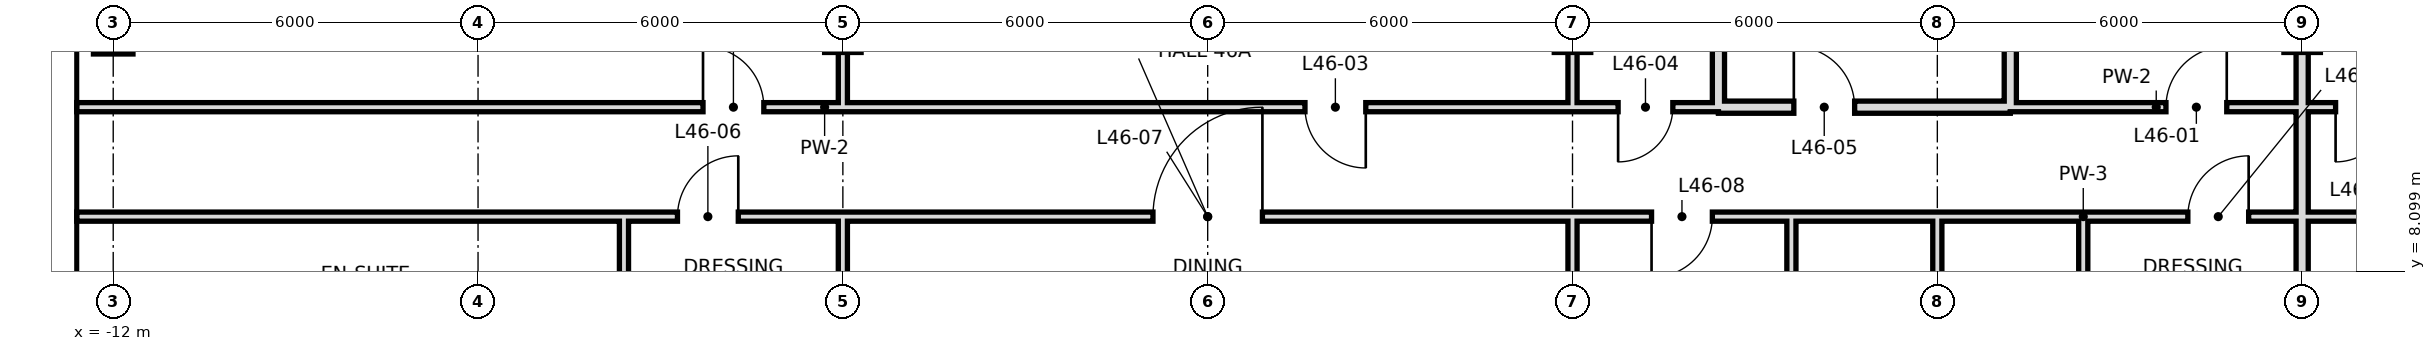
"""IFC4 building model, lengths in metres.
Left out: names, types, materials, properties, quantities, classifications, styles, units other than length and angle.
Written with IfcOpenShell. Run it as: python <this file> out.ifc"""

import sys

from ifc_helpers import new_model, si_unit, direction, frame, frame_2d, origin, origin_2d, place, context, subcontext, project, spatial, rectangle, hollow_rectangle, extrude, element, fill, save


model = new_model("IFC4")
c1 = context("Model", 3, precision=1e-05, world=origin(), true_north=direction((0.0, 1.0)))
c2 = subcontext(c1, "Body", "Model", "MODEL_VIEW")
j1 = project(units=[si_unit("LENGTHUNIT", "METRE"), si_unit("PLANEANGLEUNIT", "RADIAN")], contexts=[c1])
p1 = place(None, origin())
s1 = spatial("IfcSite", under=j1, at=p1, CompositionType="ELEMENT")
p2 = place(p1, origin())
s2 = spatial("IfcBuilding", under=s1, at=p2, CompositionType="ELEMENT")
p3 = place(p2, frame((0.0, 0.0, 199.2)))
s3 = spatial("IfcBuildingStorey", under=s2, at=p3, CompositionType="ELEMENT", Elevation=199.2)
p4 = place(p3, frame((-12.0, 12.0, 0.0), z_axis=(0.0, 0.0, 1.0), x_axis=(1.0, 0.0, 0.0)))
e1 = element("IfcColumn", 1, at=p4, inside=s3, PredefinedType="COLUMN", context=c2, shape_type="SweptSolid", body=[
    extrude(hollow_rectangle(XDim=0.65, YDim=0.65, WallThickness=0.032, at=origin_2d()), origin(), (0.0, 0.0, 1.0), 3.6),
])
p5 = place(p3, frame((-3.6, 6.0, 0.0), z_axis=(0.0, 0.0, 1.0), x_axis=(0.0, 1.0, 0.0)))
e2 = element("IfcWall", 2, at=p5, inside=s3, PredefinedType="PARTITIONING", context=c2, shape_type="SweptSolid", body=[
    extrude(rectangle(XDim=3.0, YDim=0.15, at=frame_2d((1.5, 0.0))), origin(), (0.0, 0.0, 1.0), 3.42),
])
p6 = place(p3, frame((0.0, 0.0, 0.0), z_axis=(0.0, 0.0, 1.0), x_axis=(0.0, 1.0, 0.0)))
e3 = element("IfcWall", 3, at=p6, inside=s3, PredefinedType="PARTITIONING", context=c2, shape_type="SweptSolid", body=[
    extrude(rectangle(XDim=9.0, YDim=0.15, at=frame_2d((4.5, 0.0))), origin(), (0.0, 0.0, 1.0), 2.72),
])
p7 = place(p3, frame((0.0, 10.8, 0.0), z_axis=(0.0, 0.0, 1.0), x_axis=(0.0, 1.0, 0.0)))
e4 = element("IfcWall", 4, at=p7, inside=s3, PredefinedType="PARTITIONING", context=c2, shape_type="SweptSolid", body=[
    extrude(rectangle(XDim=7.2, YDim=0.15, at=frame_2d((3.6, 0.0))), origin(), (0.0, 0.0, 1.0), 2.72),
])
p8 = place(p3, frame((12.0, 0.0, 0.0), z_axis=(0.0, 0.0, 1.0), x_axis=(0.0, 1.0, 0.0)))
e5 = element("IfcWall", 5, at=p8, inside=s3, PredefinedType="PARTITIONING", context=c2, shape_type="SweptSolid", body=[
    extrude(rectangle(XDim=9.0, YDim=0.15, at=frame_2d((4.5, 0.0))), origin(), (0.0, 0.0, 1.0), 2.72),
])
p9 = place(p3, frame((12.0, 10.8, 0.0), z_axis=(0.0, 0.0, 1.0), x_axis=(0.0, 1.0, 0.0)))
e6 = element("IfcWall", 6, at=p9, inside=s3, PredefinedType="PARTITIONING", context=c2, shape_type="SweptSolid", body=[
    extrude(rectangle(XDim=4.5, YDim=0.15, at=frame_2d((2.25, 0.0))), origin(), (0.0, 0.0, 1.0), 2.72),
])
p10 = place(p3, frame((14.4, 10.8, 0.0), z_axis=(0.0, 0.0, 1.0), x_axis=(0.0, 1.0, 0.0)))
e7 = element("IfcWall", 7, at=p10, inside=s3, PredefinedType="SOLIDWALL", context=c2, shape_type="SweptSolid", body=[
    extrude(rectangle(XDim=4.5, YDim=0.2, at=frame_2d((2.25, 0.0))), origin(), (0.0, 0.0, 1.0), 2.72),
])
p11 = place(p3, frame((15.6, 6.0, 0.0), z_axis=(0.0, 0.0, 1.0), x_axis=(0.0, 1.0, 0.0)))
e8 = element("IfcWall", 8, at=p11, inside=s3, PredefinedType="PARTITIONING", context=c2, shape_type="SweptSolid", body=[
    extrude(rectangle(XDim=3.0, YDim=0.15, at=frame_2d((1.5, 0.0))), origin(), (0.0, 0.0, 1.0), 3.42),
])
p12 = place(p3, frame((18.0, 6.0, 0.0), z_axis=(0.0, 0.0, 1.0), x_axis=(0.0, 1.0, 0.0)))
e9 = element("IfcWall", 9, at=p12, inside=s3, PredefinedType="PARTITIONING", context=c2, shape_type="SweptSolid", body=[
    extrude(rectangle(XDim=3.0, YDim=0.15, at=frame_2d((1.5, 0.0))), origin(), (0.0, 0.0, 1.0), 2.72),
])
p13 = place(p3, frame((19.2, 10.8, 0.0), z_axis=(0.0, 0.0, 1.0), x_axis=(0.0, 1.0, 0.0)))
e10 = element("IfcWall", 10, at=p13, inside=s3, PredefinedType="SOLIDWALL", context=c2, shape_type="SweptSolid", body=[
    extrude(rectangle(XDim=4.5, YDim=0.2, at=frame_2d((2.25, 0.0))), origin(), (0.0, 0.0, 1.0), 2.72),
])
p14 = place(p3, frame((20.4, 6.0, 0.0), z_axis=(0.0, 0.0, 1.0), x_axis=(0.0, 1.0, 0.0)))
e11 = element("IfcWall", 11, at=p14, inside=s3, PredefinedType="PARTITIONING", context=c2, shape_type="SweptSolid", body=[
    extrude(rectangle(XDim=3.0, YDim=0.15, at=frame_2d((1.5, 0.0))), origin(), (0.0, 0.0, 1.0), 3.42),
])
p15 = place(p3, frame((24.0, 0.0, 0.0), z_axis=(0.0, 0.0, 1.0), x_axis=(0.0, 1.0, 0.0)))
e12 = element("IfcWall", 12, at=p15, inside=s3, PredefinedType="SOLIDWALL", context=c2, shape_type="SweptSolid", body=[
    extrude(rectangle(XDim=15.3, YDim=0.2, at=frame_2d((7.65, 0.0))), origin(), (0.0, 0.0, 1.0), 2.72),
])
p16 = place(p3, frame((14.4, 10.8, 0.0), z_axis=(0.0, 0.0, 1.0), x_axis=(1.0, 0.0, 0.0)))
e13 = element("IfcWall", 13, at=p16, inside=s3, PredefinedType="SOLIDWALL", context=c2, shape_type="SweptSolid", body=[
    extrude(rectangle(XDim=4.8, YDim=0.2, at=frame_2d((2.4, 0.0))), origin(), (0.0, 0.0, 1.0), 2.72),
])
p17 = place(p16, frame((1.24, 0.0, 0.0)))
e14 = element("IfcOpeningElement", 14, at=p17, cuts=e13, PredefinedType="OPENING", context=c2, shape_type="SweptSolid", body=[
    extrude(rectangle(XDim=1.0, YDim=2.4, at=frame_2d((0.5, 1.2))), frame((0.0, 0.11, 0.0), z_axis=(0.0, -1.0, 0.0), x_axis=(1.0, 0.0, 0.0)), (0.0, 0.0, 1.0), 0.22),
])
p18 = place(p3, frame((-12.6, 10.8, 0.0), z_axis=(0.0, 0.0, 1.0), x_axis=(1.0, 0.0, 0.0)))
e15 = element("IfcWall", 15, at=p18, inside=s3, PredefinedType="PARTITIONING", context=c2, shape_type="SweptSolid", body=[
    extrude(rectangle(XDim=24.6, YDim=0.15, at=frame_2d((12.3, 0.0))), origin(), (0.0, 0.0, 1.0), 3.42),
])
p19 = place(p18, frame((10.3, 0.0, 0.0)))
e16 = element("IfcOpeningElement", 16, at=p19, cuts=e15, PredefinedType="OPENING", context=c2, shape_type="SweptSolid", body=[
    extrude(rectangle(XDim=1.0, YDim=2.4, at=frame_2d((0.5, 1.2))), frame((0.0, 0.085, 0.0), z_axis=(0.0, -1.0, 0.0), x_axis=(1.0, 0.0, 0.0)), (0.0, 0.0, 1.0), 0.17),
])
p20 = place(p18, frame((20.2, 0.0, 0.0)))
e17 = element("IfcOpeningElement", 17, at=p20, cuts=e15, PredefinedType="OPENING", context=c2, shape_type="SweptSolid", body=[
    extrude(rectangle(XDim=1.0, YDim=2.4, at=frame_2d((0.5, 1.2))), frame((0.0, 0.085, 0.0), z_axis=(0.0, -1.0, 0.0), x_axis=(1.0, 0.0, 0.0)), (0.0, 0.0, 1.0), 0.17),
])
p21 = place(p3, frame((19.2, 10.8, 0.0), z_axis=(0.0, 0.0, 1.0), x_axis=(1.0, 0.0, 0.0)))
e18 = element("IfcWall", 18, at=p21, inside=s3, PredefinedType="PARTITIONING", context=c2, shape_type="SweptSolid", body=[
    extrude(rectangle(XDim=4.8, YDim=0.15, at=frame_2d((2.4, 0.0))), origin(), (0.0, 0.0, 1.0), 3.42),
])
p22 = place(p21, frame((2.56, 0.0, 0.0)))
e19 = element("IfcOpeningElement", 19, at=p22, cuts=e18, PredefinedType="OPENING", context=c2, shape_type="SweptSolid", body=[
    extrude(rectangle(XDim=1.0, YDim=2.4, at=frame_2d((0.5, 1.2))), frame((0.0, 0.085, 0.0), z_axis=(0.0, -1.0, 0.0), x_axis=(1.0, 0.0, 0.0)), (0.0, 0.0, 1.0), 0.17),
])
p23 = place(p3, frame((12.0, 10.8, 0.0), z_axis=(0.0, 0.0, 1.0), x_axis=(1.0, 0.0, 0.0)))
e20 = element("IfcWall", 20, at=p23, inside=s3, PredefinedType="PARTITIONING", context=c2, shape_type="SweptSolid", body=[
    extrude(rectangle(XDim=2.4, YDim=0.15, at=frame_2d((1.2, 0.0))), origin(), (0.0, 0.0, 1.0), 3.42),
])
p24 = place(p23, frame((0.75, 0.0, 0.0)))
e21 = element("IfcOpeningElement", 21, at=p24, cuts=e20, PredefinedType="OPENING", context=c2, shape_type="SweptSolid", body=[
    extrude(rectangle(XDim=0.9, YDim=2.4, at=frame_2d((0.45, 1.2))), frame((0.0, 0.085, 0.0), z_axis=(0.0, -1.0, 0.0), x_axis=(1.0, 0.0, 0.0)), (0.0, 0.0, 1.0), 0.17),
])
p25 = place(p3, frame((24.0, 10.8, 0.0), z_axis=(0.0, 0.0, 1.0), x_axis=(1.0, 0.0, 0.0)))
e22 = element("IfcWall", 22, at=p25, inside=s3, PredefinedType="PARTITIONING", context=c2, shape_type="SweptSolid", body=[
    extrude(rectangle(XDim=2.4, YDim=0.15, at=frame_2d((1.2, 0.0))), origin(), (0.0, 0.0, 1.0), 3.42),
])
p26 = place(p25, frame((0.55, 0.0, 0.0)))
e23 = element("IfcOpeningElement", 23, at=p26, cuts=e22, PredefinedType="OPENING", context=c2, shape_type="SweptSolid", body=[
    extrude(rectangle(XDim=0.9, YDim=2.4, at=frame_2d((0.45, 1.2))), frame((0.0, 0.085, 0.0), z_axis=(0.0, -1.0, 0.0), x_axis=(1.0, 0.0, 0.0)), (0.0, 0.0, 1.0), 0.17),
])
p27 = place(p3, frame((-3.6, 9.0, 0.0), z_axis=(0.0, 0.0, 1.0), x_axis=(1.0, 0.0, 0.0)))
e24 = element("IfcWall", 24, at=p27, inside=s3, PredefinedType="PARTITIONING", context=c2, shape_type="SweptSolid", body=[
    extrude(rectangle(XDim=19.2, YDim=0.15, at=frame_2d((9.6, 0.0))), origin(), (0.0, 0.0, 1.0), 3.42),
])
p28 = place(p27, frame((0.88, 0.0, 0.0)))
e25 = element("IfcOpeningElement", 25, at=p28, cuts=e24, PredefinedType="OPENING", context=c2, shape_type="SweptSolid", body=[
    extrude(rectangle(XDim=1.0, YDim=2.4, at=frame_2d((0.5, 1.2))), frame((0.0, 0.085, 0.0), z_axis=(0.0, -1.0, 0.0), x_axis=(1.0, 0.0, 0.0)), (0.0, 0.0, 1.0), 0.17),
])
p29 = place(p27, frame((8.7, 0.0, 0.0)))
e26 = element("IfcOpeningElement", 26, at=p29, cuts=e24, PredefinedType="OPENING", context=c2, shape_type="SweptSolid", body=[
    extrude(rectangle(XDim=1.8, YDim=2.4, at=frame_2d((0.9, 1.2))), frame((0.0, 0.085, 0.0), z_axis=(0.0, -1.0, 0.0), x_axis=(1.0, 0.0, 0.0)), (0.0, 0.0, 1.0), 0.17),
])
p30 = place(p27, frame((16.9, 0.0, 0.0)))
e27 = element("IfcOpeningElement", 27, at=p30, cuts=e24, PredefinedType="OPENING", context=c2, shape_type="SweptSolid", body=[
    extrude(rectangle(XDim=1.0, YDim=2.4, at=frame_2d((0.5, 1.2))), frame((0.0, 0.085, 0.0), z_axis=(0.0, -1.0, 0.0), x_axis=(1.0, 0.0, 0.0)), (0.0, 0.0, 1.0), 0.17),
])
p31 = place(p3, frame((20.4, 9.0, 0.0), z_axis=(0.0, 0.0, 1.0), x_axis=(1.0, 0.0, 0.0)))
e28 = element("IfcWall", 28, at=p31, inside=s3, PredefinedType="PARTITIONING", context=c2, shape_type="SweptSolid", body=[
    extrude(rectangle(XDim=18.6, YDim=0.15, at=frame_2d((9.3, 0.0))), origin(), (0.0, 0.0, 1.0), 3.42),
])
p32 = place(p31, frame((1.72, 0.0, 0.0)))
e29 = element("IfcOpeningElement", 29, at=p32, cuts=e28, PredefinedType="OPENING", context=c2, shape_type="SweptSolid", body=[
    extrude(rectangle(XDim=1.0, YDim=2.4, at=frame_2d((0.5, 1.2))), frame((0.0, 0.085, 0.0), z_axis=(0.0, -1.0, 0.0), x_axis=(1.0, 0.0, 0.0)), (0.0, 0.0, 1.0), 0.17),
])
p33 = place(p31, frame((7.0, 0.0, 0.0)))
e30 = element("IfcOpeningElement", 30, at=p33, cuts=e28, PredefinedType="OPENING", context=c2, shape_type="SweptSolid", body=[
    extrude(rectangle(XDim=1.0, YDim=2.4, at=frame_2d((0.5, 1.2))), frame((0.0, 0.085, 0.0), z_axis=(0.0, -1.0, 0.0), x_axis=(1.0, 0.0, 0.0)), (0.0, 0.0, 1.0), 0.17),
])
p34 = place(p31, frame((16.3, 0.0, 0.0)))
e31 = element("IfcOpeningElement", 31, at=p34, cuts=e28, PredefinedType="OPENING", context=c2, shape_type="SweptSolid", body=[
    extrude(rectangle(XDim=1.0, YDim=2.4, at=frame_2d((0.5, 1.2))), frame((0.0, 0.085, 0.0), z_axis=(0.0, -1.0, 0.0), x_axis=(1.0, 0.0, 0.0)), (0.0, 0.0, 1.0), 0.17),
])
p35 = place(p3, frame((-12.6, 9.0, 0.0), z_axis=(0.0, 0.0, 1.0), x_axis=(1.0, 0.0, 0.0)))
e32 = element("IfcWall", 32, at=p35, inside=s3, PredefinedType="PARTITIONING", context=c2, shape_type="SweptSolid", body=[
    extrude(rectangle(XDim=9.0, YDim=0.15, at=frame_2d((4.5, 0.0))), origin(), (0.0, 0.0, 1.0), 3.42),
])
p36 = place(p3, frame((15.6, 9.0, 0.0), z_axis=(0.0, 0.0, 1.0), x_axis=(1.0, 0.0, 0.0)))
e33 = element("IfcWall", 33, at=p36, inside=s3, PredefinedType="PARTITIONING", context=c2, shape_type="SweptSolid", body=[
    extrude(rectangle(XDim=4.8, YDim=0.15, at=frame_2d((2.4, 0.0))), origin(), (0.0, 0.0, 1.0), 3.42),
])
p37 = place(p22, frame((1.0, 0.0, 0.0), z_axis=(0.0, 0.0, 1.0), x_axis=(-1.0, 0.0, 0.0)))
e34 = element("IfcDoor", 34, at=p37, inside=s3, OperationType="SINGLE_SWING_LEFT", PredefinedType="DOOR", context=c2, shape_type="SweptSolid", body=[
    extrude(rectangle(XDim=1.0, YDim=2.4, at=frame_2d((0.5, 1.2))), frame((0.0, 0.025, 0.0), z_axis=(0.0, -1.0, 0.0), x_axis=(1.0, 0.0, 0.0)), (0.0, 0.0, 1.0), 0.05),
])
fill(e19, e34)
p38 = place(p19, origin())
e35 = element("IfcDoor", 35, at=p38, inside=s3, OperationType="SINGLE_SWING_LEFT", PredefinedType="DOOR", context=c2, shape_type="SweptSolid", body=[
    extrude(rectangle(XDim=1.0, YDim=2.4, at=frame_2d((0.5, 1.2))), frame((0.0, 0.025, 0.0), z_axis=(0.0, -1.0, 0.0), x_axis=(1.0, 0.0, 0.0)), (0.0, 0.0, 1.0), 0.05),
])
fill(e16, e35)
p39 = place(p20, origin())
e36 = element("IfcDoor", 36, at=p39, inside=s3, OperationType="SINGLE_SWING_RIGHT", PredefinedType="DOOR", context=c2, shape_type="SweptSolid", body=[
    extrude(rectangle(XDim=1.0, YDim=2.4, at=frame_2d((0.5, 1.2))), frame((0.0, 0.025, 0.0), z_axis=(0.0, -1.0, 0.0), x_axis=(1.0, 0.0, 0.0)), (0.0, 0.0, 1.0), 0.05),
])
fill(e17, e36)
p40 = place(p24, frame((0.9, 0.0, 0.0), z_axis=(0.0, 0.0, 1.0), x_axis=(-1.0, 0.0, 0.0)))
e37 = element("IfcDoor", 37, at=p40, inside=s3, OperationType="SINGLE_SWING_RIGHT", PredefinedType="DOOR", context=c2, shape_type="SweptSolid", body=[
    extrude(rectangle(XDim=0.9, YDim=2.4, at=frame_2d((0.45, 1.2))), frame((0.0, 0.025, 0.0), z_axis=(0.0, -1.0, 0.0), x_axis=(1.0, 0.0, 0.0)), (0.0, 0.0, 1.0), 0.05),
])
fill(e21, e37)
p41 = place(p17, origin())
e38 = element("IfcDoor", 38, at=p41, inside=s3, OperationType="SINGLE_SWING_LEFT", PredefinedType="DOOR", context=c2, shape_type="SweptSolid", body=[
    extrude(rectangle(XDim=1.0, YDim=2.4, at=frame_2d((0.5, 1.2))), frame((0.0, 0.025, 0.0), z_axis=(0.0, -1.0, 0.0), x_axis=(1.0, 0.0, 0.0)), (0.0, 0.0, 1.0), 0.05),
])
fill(e14, e38)
p42 = place(p28, frame((1.0, 0.0, 0.0), z_axis=(0.0, 0.0, 1.0), x_axis=(-1.0, 0.0, 0.0)))
e39 = element("IfcDoor", 39, at=p42, inside=s3, OperationType="SINGLE_SWING_LEFT", PredefinedType="DOOR", context=c2, shape_type="SweptSolid", body=[
    extrude(rectangle(XDim=1.0, YDim=2.4, at=frame_2d((0.5, 1.2))), frame((0.0, 0.025, 0.0), z_axis=(0.0, -1.0, 0.0), x_axis=(1.0, 0.0, 0.0)), (0.0, 0.0, 1.0), 0.05),
])
fill(e25, e39)
p43 = place(p29, frame((1.8, 0.0, 0.0), z_axis=(0.0, 0.0, 1.0), x_axis=(-1.0, 0.0, 0.0)))
e40 = element("IfcDoor", 40, at=p43, inside=s3, OperationType="SINGLE_SWING_LEFT", PredefinedType="DOOR", context=c2, shape_type="SweptSolid", body=[
    extrude(rectangle(XDim=1.8, YDim=2.4, at=frame_2d((0.9, 1.2))), frame((0.0, 0.025, 0.0), z_axis=(0.0, -1.0, 0.0), x_axis=(1.0, 0.0, 0.0)), (0.0, 0.0, 1.0), 0.05),
])
fill(e26, e40)
p44 = place(p30, frame((1.0, 0.0, 0.0), z_axis=(0.0, 0.0, 1.0), x_axis=(-1.0, 0.0, 0.0)))
e41 = element("IfcDoor", 41, at=p44, inside=s3, OperationType="SINGLE_SWING_RIGHT", PredefinedType="DOOR", context=c2, shape_type="SweptSolid", body=[
    extrude(rectangle(XDim=1.0, YDim=2.4, at=frame_2d((0.5, 1.2))), frame((0.0, 0.025, 0.0), z_axis=(0.0, -1.0, 0.0), x_axis=(1.0, 0.0, 0.0)), (0.0, 0.0, 1.0), 0.05),
])
fill(e27, e41)
p45 = place(p32, frame((1.0, 0.0, 0.0), z_axis=(0.0, 0.0, 1.0), x_axis=(-1.0, 0.0, 0.0)))
e42 = element("IfcDoor", 42, at=p45, inside=s3, OperationType="SINGLE_SWING_LEFT", PredefinedType="DOOR", context=c2, shape_type="SweptSolid", body=[
    extrude(rectangle(XDim=1.0, YDim=2.4, at=frame_2d((0.5, 1.2))), frame((0.0, 0.025, 0.0), z_axis=(0.0, -1.0, 0.0), x_axis=(1.0, 0.0, 0.0)), (0.0, 0.0, 1.0), 0.05),
])
fill(e29, e42)
p46 = place(p26, frame((0.9, 0.0, 0.0), z_axis=(0.0, 0.0, 1.0), x_axis=(-1.0, 0.0, 0.0)))
e43 = element("IfcDoor", 43, at=p46, inside=s3, OperationType="SINGLE_SWING_RIGHT", PredefinedType="DOOR", context=c2, shape_type="SweptSolid", body=[
    extrude(rectangle(XDim=0.9, YDim=2.4, at=frame_2d((0.45, 1.2))), frame((0.0, 0.025, 0.0), z_axis=(0.0, -1.0, 0.0), x_axis=(1.0, 0.0, 0.0)), (0.0, 0.0, 1.0), 0.05),
])
fill(e23, e43)
save(model, sys.argv[1])
